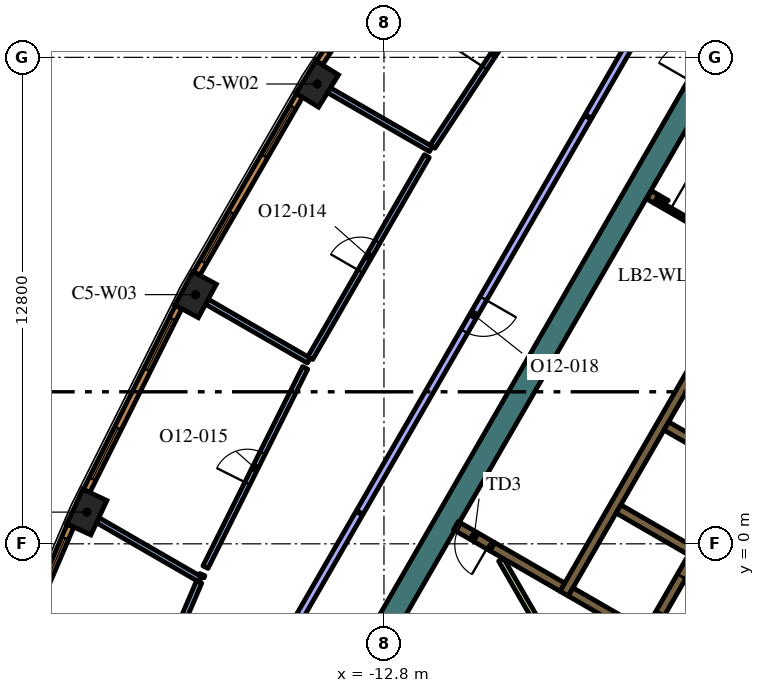
"""IFC4 building model, lengths in metres.
Left out: names, types, materials, properties, quantities, classifications, styles, units other than length and angle.
Written with IfcOpenShell. Run it as: python <this file> out.ifc"""

import sys

from ifc_helpers import new_model, si_unit, direction, frame, frame_2d, origin, origin_2d, place, context, subcontext, project, spatial, polyline, rectangle, outline, extrude, element, fill, save


model = new_model("IFC4")
c1 = context("Model", 3, precision=1e-05, world=origin(), true_north=direction((0.0, 1.0)))
c2 = subcontext(c1, "Body", "Model", "MODEL_VIEW")
j1 = project(units=[si_unit("LENGTHUNIT", "METRE"), si_unit("PLANEANGLEUNIT", "RADIAN")], contexts=[c1])
p1 = place(None, origin())
s1 = spatial("IfcSite", under=j1, at=p1, CompositionType="ELEMENT")
p2 = place(p1, origin())
s2 = spatial("IfcBuilding", under=s1, at=p2, CompositionType="ELEMENT")
p3 = place(p2, frame((0.0, 0.0, 288.0)))
s3 = spatial("IfcBuildingStorey", under=s2, at=p3, CompositionType="ELEMENT", Elevation=288.0)
for number, where, z_axis, x_axis in (
    (1, (-14.556, 12.098, 0.0), (0.0, 0.0, 1.0), (-0.526, -0.851, 0.0)),
    (2, (-17.756, 6.557, 0.0), (0.0, 0.0, 1.0), (-0.474, -0.881, 0.0)),
    (3, (-20.619, 0.834, 0.0), (0.0, 0.0, 1.0), (-0.421, -0.907, 0.0)),
):
    element("IfcColumn", number, at=place(p3, frame(where, z_axis=z_axis, x_axis=x_axis)), inside=s3, PredefinedType="COLUMN", context=c2, shape_type="SweptSolid", body=[
        extrude(rectangle(XDim=1.0, YDim=0.7, at=origin_2d()), origin(), (0.0, 0.0, 1.0), 4.2),
    ])
p4 = place(p3, origin())
e4 = element("IfcWall", 4, at=p4, inside=s3, PredefinedType="SOLIDWALL", context=c2, shape_type="SweptSolid", body=[
    extrude(outline(polyline([(-15.502, -6.35), (-4.912, 11.992), (-4.393, 11.692), (-10.815, 0.569), (-10.84, 0.583), (-10.84, 0.583), (-10.84, 0.583), (-10.965, 0.367), (-10.965, 0.367), (-10.965, 0.367), (-10.94, 0.352), (-11.033, 0.191), (-14.809, -6.35), (-15.156, -6.95), (-15.502, -6.35)])), origin(), (0.0, 0.0, 1.0), 4.2),
])
p5 = place(p3, frame((-8.06, -1.311, 0.0), z_axis=(0.0, 0.0, 1.0), x_axis=(0.50000273126, 0.866023826885, 0.0)))
e5 = element("IfcWall", 5, at=p5, inside=s3, PredefinedType="SOLIDWALL", context=c2, shape_type="SweptSolid", body=[
    extrude(rectangle(XDim=10.33, YDim=0.25, at=frame_2d((5.165, 0.0))), origin(), (0.0, 0.0, 1.0), 4.2),
])
for number, where, z_axis, x_axis in (
    (6, (-5.369, 3.1, 0.0), (0.0, 0.0, 1.0), (0.866, -0.5, 0.0)),
    (7, (-4.724, -0.182, 0.0), (0.0, 0.0, 1.0), (-0.866, 0.5, 0.0)),
):
    element("IfcWall", number, at=place(p3, frame(where, z_axis=z_axis, x_axis=x_axis)), inside=s3, PredefinedType="SOLIDWALL", context=c2, shape_type="SweptSolid", body=[
        extrude(rectangle(XDim=2.2, YDim=0.25, at=frame_2d((1.1, 0.0))), origin(), (0.0, 0.0, 1.0), 4.2),
    ])
p6 = place(p3, frame((-7.889, -1.265, 0.0), z_axis=(0.0, 0.0, 1.0), x_axis=(0.866057815567, -0.499943856944, 0.0)))
e8 = element("IfcWall", 8, at=p6, inside=s3, PredefinedType="SOLIDWALL", context=c2, shape_type="SweptSolid", body=[
    extrude(rectangle(XDim=2.45, YDim=0.25, at=frame_2d((1.225, 0.0))), origin(), (0.0, 0.0, 1.0), 4.2),
])
p7 = place(p3, frame((-9.95, -0.075, 0.0), z_axis=(0.0, 0.0, 1.0), x_axis=(0.865962177421, -0.500109495288, 0.0)))
e9 = element("IfcWall", 9, at=p7, inside=s3, PredefinedType="SOLIDWALL", context=c2, shape_type="SweptSolid", body=[
    extrude(rectangle(XDim=2.129, YDim=0.25, at=frame_2d((1.065, 0.0))), origin(), (0.0, 0.0, 1.0), 4.2),
])
p8 = place(p3, frame((-5.629, 9.07, 0.0), z_axis=(0.0, 0.0, 1.0), x_axis=(-0.866185586049, 0.49972245349, 0.0)))
e10 = element("IfcWall", 10, at=p8, inside=s3, PredefinedType="SOLIDWALL", context=c2, shape_type="SweptSolid", body=[
    extrude(rectangle(XDim=0.22, YDim=0.25, at=frame_2d((0.11, 0.0))), origin(), (0.0, 0.0, 1.0), 4.2),
])
e11 = element("IfcWall", 11, at=p4, inside=s3, PredefinedType="SOLIDWALL", context=c2, shape_type="SweptSolid", body=[
    extrude(outline(polyline([(-5.689, 8.96), (-5.69, 8.961), (-5.565, 9.177), (-5.319, 9.035), (-5.335, 9.026), (-5.351, 9.015), (-5.366, 9.002), (-5.379, 8.988), (-5.392, 8.972), (-5.402, 8.956), (-5.412, 8.939), (-5.629, 9.064), (-5.629, 9.064), (-5.689, 8.96)])), origin(), (0.0, 0.0, 1.0), 4.2),
])
p9 = place(p3, frame((-9.718, -0.417, 0.0), z_axis=(0.0, 0.0, 1.0), x_axis=(0.499966538646, -0.866044721844, 0.0)))
e12 = element("IfcWall", 12, at=p9, inside=s3, PredefinedType="PARTITIONING", context=c2, shape_type="SweptSolid", body=[
    extrude(rectangle(XDim=2.511, YDim=0.15, at=frame_2d((1.255, 0.0))), origin(), (0.0, 0.0, 1.0), 3.55),
])
p10 = place(p3, frame((-0.898, 6.194, 0.0), z_axis=(0.0, 0.0, 1.0), x_axis=(-0.499996202215, -0.866027596426, 0.0)))
e13 = element("IfcWall", 13, at=p10, inside=s3, PredefinedType="SOLIDWALL", context=c2, shape_type="SweptSolid", body=[
    extrude(rectangle(XDim=9.83, YDim=0.25, at=frame_2d((4.915, 0.0))), origin(), (0.0, 0.0, 1.0), 4.2),
])
p11 = place(p10, frame((0.585, 0.0, 0.0)))
e14 = element("IfcOpeningElement", 14, at=p11, cuts=e13, PredefinedType="OPENING", context=c2, shape_type="SweptSolid", body=[
    extrude(rectangle(XDim=1.1, YDim=2.1, at=frame_2d((0.55, 1.05))), frame((0.0, 0.135, 0.0), z_axis=(0.0, -1.0, 0.0), x_axis=(1.0, 0.0, 0.0)), (0.0, 0.0, 1.0), 0.27),
])
p12 = place(p10, frame((3.105, 0.0, 0.0)))
e15 = element("IfcOpeningElement", 15, at=p12, cuts=e13, PredefinedType="OPENING", context=c2, shape_type="SweptSolid", body=[
    extrude(rectangle(XDim=1.1, YDim=2.1, at=frame_2d((0.55, 1.05))), frame((0.0, 0.135, 0.0), z_axis=(0.0, -1.0, 0.0), x_axis=(1.0, 0.0, 0.0)), (0.0, 0.0, 1.0), 0.27),
])
p13 = place(p10, frame((5.625, 0.0, 0.0)))
e16 = element("IfcOpeningElement", 16, at=p13, cuts=e13, PredefinedType="OPENING", context=c2, shape_type="SweptSolid", body=[
    extrude(rectangle(XDim=1.1, YDim=2.1, at=frame_2d((0.55, 1.05))), frame((0.0, 0.135, 0.0), z_axis=(0.0, -1.0, 0.0), x_axis=(1.0, 0.0, 0.0)), (0.0, 0.0, 1.0), 0.27),
])
p14 = place(p10, frame((8.145, 0.0, 0.0)))
e17 = element("IfcOpeningElement", 17, at=p14, cuts=e13, PredefinedType="OPENING", context=c2, shape_type="SweptSolid", body=[
    extrude(rectangle(XDim=1.1, YDim=2.1, at=frame_2d((0.55, 1.05))), frame((0.0, 0.135, 0.0), z_axis=(0.0, -1.0, 0.0), x_axis=(1.0, 0.0, 0.0)), (0.0, 0.0, 1.0), 0.27),
])
p15 = place(p3, frame((-5.659, 9.012, 0.0), z_axis=(0.0, 0.0, 1.0), x_axis=(0.866009402589, -0.500027713859, 0.0)))
e18 = element("IfcWall", 18, at=p15, inside=s3, PredefinedType="PARTITIONING", context=c2, shape_type="SweptSolid", body=[
    extrude(rectangle(XDim=2.1, YDim=0.12, at=frame_2d((1.05, 0.0))), origin(), (0.0, 0.0, 1.0), 3.55),
])
p16 = place(p15, frame((0.45, 0.0, 0.0)))
e19 = element("IfcOpeningElement", 19, at=p16, cuts=e18, PredefinedType="OPENING", context=c2, shape_type="SweptSolid", body=[
    extrude(rectangle(XDim=1.2, YDim=2.1, at=frame_2d((0.6, 1.05))), frame((0.0, 0.07, 0.0), z_axis=(0.0, -1.0, 0.0), x_axis=(1.0, 0.0, 0.0)), (0.0, 0.0, 1.0), 0.14),
])
p17 = place(p3, frame((-4.652, 11.842, 0.0), z_axis=(0.0, 0.0, 1.0), x_axis=(0.500062241894, 0.865989465428, 0.0)))
e20 = element("IfcWall", 20, at=p17, inside=s3, PredefinedType="SOLIDWALL", context=c2, shape_type="SweptSolid", body=[
    extrude(rectangle(XDim=1.7, YDim=0.6, at=frame_2d((0.85, 0.0))), origin(), (0.0, 0.0, 1.0), 4.2),
])
p18 = place(p17, frame((0.25, 0.0, 0.0)))
e21 = element("IfcOpeningElement", 21, at=p18, cuts=e20, PredefinedType="OPENING", context=c2, shape_type="SweptSolid", body=[
    extrude(rectangle(XDim=1.2, YDim=2.1, at=frame_2d((0.6, 1.05))), frame((0.0, 0.31, 0.0), z_axis=(0.0, -1.0, 0.0), x_axis=(1.0, 0.0, 0.0)), (0.0, 0.0, 1.0), 0.62),
])
p19 = place(p3, frame((-9.95, -0.075, 0.0), z_axis=(0.0, 0.0, 1.0), x_axis=(-0.865952669392, 0.500125958508, 0.0)))
e22 = element("IfcWall", 22, at=p19, inside=s3, PredefinedType="SOLIDWALL", context=c2, shape_type="SweptSolid", body=[
    extrude(rectangle(XDim=1.1, YDim=0.25, at=frame_2d((0.55, 0.0))), origin(), (0.0, 0.0, 1.0), 4.2),
])
p20 = place(p19, frame((0.1, 0.0, 0.0)))
e23 = element("IfcOpeningElement", 23, at=p20, cuts=e22, PredefinedType="OPENING", context=c2, shape_type="SweptSolid", body=[
    extrude(rectangle(XDim=0.9, YDim=2.1, at=frame_2d((0.45, 1.05))), frame((0.0, 0.135, 0.0), z_axis=(0.0, -1.0, 0.0), x_axis=(1.0, 0.0, 0.0)), (0.0, 0.0, 1.0), 0.27),
])
p21 = place(p3, frame((-11.564, 10.387, 0.0), z_axis=(0.0, 0.0, 1.0), x_axis=(-0.86604641216, 0.499963610661, 0.0)))
e24 = element("IfcWall", 24, at=p21, inside=s3, PredefinedType="PARTITIONING", context=c2, shape_type="SweptSolid", body=[
    extrude(rectangle(XDim=3.096, YDim=0.15, at=frame_2d((1.548, 0.0))), origin(), (0.0, 0.0, 1.0), 3.55),
])
p22 = place(p3, frame((-11.523, 10.449, 0.0), z_axis=(0.0, 0.0, 1.0), x_axis=(0.550751709023, 0.834669129061, 0.0)))
e25 = element("IfcWall", 25, at=p22, inside=s3, PredefinedType="PARTITIONING", context=c2, shape_type="SweptSolid", body=[
    extrude(rectangle(XDim=5.788, YDim=0.15, at=frame_2d((2.894, 0.0))), origin(), (0.0, 0.0, 1.0), 3.55),
])
p23 = place(p22, frame((2.488, 0.0, 0.0)))
e26 = element("IfcOpeningElement", 26, at=p23, cuts=e25, PredefinedType="OPENING", context=c2, shape_type="SweptSolid", body=[
    extrude(rectangle(XDim=0.9, YDim=2.1, at=frame_2d((0.45, 1.05))), frame((0.0, 0.085, 0.0), z_axis=(0.0, -1.0, 0.0), x_axis=(1.0, 0.0, 0.0)), (0.0, 0.0, 1.0), 0.17),
])
p24 = place(p3, frame((-14.777, 4.822, 0.0), z_axis=(0.0, 0.0, 1.0), x_axis=(-0.865992557167, 0.500056887695, 0.0)))
e27 = element("IfcWall", 27, at=p24, inside=s3, PredefinedType="PARTITIONING", context=c2, shape_type="SweptSolid", body=[
    extrude(rectangle(XDim=3.096, YDim=0.15, at=frame_2d((1.548, 0.0))), origin(), (0.0, 0.0, 1.0), 3.55),
])
p25 = place(p3, frame((-14.74, 4.887, 0.0), z_axis=(0.0, 0.0, 1.0), x_axis=(0.500007141444, 0.86602128063, 0.0)))
e28 = element("IfcWall", 28, at=p25, inside=s3, PredefinedType="PARTITIONING", context=c2, shape_type="SweptSolid", body=[
    extrude(rectangle(XDim=6.137, YDim=0.15, at=frame_2d((3.068, 0.0))), origin(), (0.0, 0.0, 1.0), 3.55),
])
p26 = place(p25, frame((2.637, 0.0, 0.0)))
e29 = element("IfcOpeningElement", 29, at=p26, cuts=e28, PredefinedType="OPENING", context=c2, shape_type="SweptSolid", body=[
    extrude(rectangle(XDim=0.9, YDim=2.1, at=frame_2d((0.45, 1.05))), frame((0.0, 0.085, 0.0), z_axis=(0.0, -1.0, 0.0), x_axis=(1.0, 0.0, 0.0)), (0.0, 0.0, 1.0), 0.17),
])
p27 = place(p3, frame((-17.635, -0.936, 0.0), z_axis=(0.0, 0.0, 1.0), x_axis=(-0.866044607523, 0.499966736674, 0.0)))
e30 = element("IfcWall", 30, at=p27, inside=s3, PredefinedType="PARTITIONING", context=c2, shape_type="SweptSolid", body=[
    extrude(rectangle(XDim=3.115, YDim=0.15, at=frame_2d((1.557, 0.0))), origin(), (0.0, 0.0, 1.0), 3.55),
])
p28 = place(p3, frame((-17.497, -0.613, 0.0), z_axis=(0.0, 0.0, 1.0), x_axis=(0.447480081559, 0.89429389834, 0.0)))
e31 = element("IfcWall", 31, at=p28, inside=s3, PredefinedType="PARTITIONING", context=c2, shape_type="SweptSolid", body=[
    extrude(rectangle(XDim=5.863, YDim=0.15, at=frame_2d((2.931, 0.0))), origin(), (0.0, 0.0, 1.0), 3.55),
])
p29 = place(p28, frame((2.463, 0.0, 0.0)))
e32 = element("IfcOpeningElement", 32, at=p29, cuts=e31, PredefinedType="OPENING", context=c2, shape_type="SweptSolid", body=[
    extrude(rectangle(XDim=0.9, YDim=2.1, at=frame_2d((0.45, 1.05))), frame((0.0, 0.085, 0.0), z_axis=(0.0, -1.0, 0.0), x_axis=(1.0, 0.0, 0.0)), (0.0, 0.0, 1.0), 0.17),
])
p30 = place(p3, frame((-17.581, -0.81, 0.0), z_axis=(0.0, 0.0, 1.0), x_axis=(-0.390033474923, -0.92080067791, 0.0)))
e33 = element("IfcWall", 33, at=p30, inside=s3, PredefinedType="PARTITIONING", context=c2, shape_type="SweptSolid", body=[
    extrude(rectangle(XDim=0.061, YDim=0.15, at=frame_2d((0.03, 0.0))), origin(), (0.0, 0.0, 1.0), 3.55),
])
p31 = place(p3, frame((-19.608, -5.549, 0.0), z_axis=(0.0, 0.0, 1.0), x_axis=(0.393352855097, 0.919387584964, 0.0)))
e34 = element("IfcWall", 34, at=p31, inside=s3, PredefinedType="PARTITIONING", context=c2, shape_type="SweptSolid", body=[
    extrude(rectangle(XDim=4.942, YDim=0.15, at=frame_2d((2.471, 0.0))), origin(), (0.0, 0.0, 1.0), 3.55),
])
p32 = place(p31, frame((2.042, 0.0, 0.0)))
e35 = element("IfcOpeningElement", 35, at=p32, cuts=e34, PredefinedType="OPENING", context=c2, shape_type="SweptSolid", body=[
    extrude(rectangle(XDim=0.9, YDim=2.1, at=frame_2d((0.45, 1.05))), frame((0.0, 0.085, 0.0), z_axis=(0.0, -1.0, 0.0), x_axis=(1.0, 0.0, 0.0)), (0.0, 0.0, 1.0), 0.17),
])
p33 = place(p3, frame((-7.436, 11.221, 0.0), z_axis=(0.0, 0.0, 1.0), x_axis=(-0.49999894854, -0.866026010844, 0.0)))
e36 = element("IfcWall", 36, at=p33, inside=s3, PredefinedType="PARTITIONING", context=c2, shape_type="SweptSolid", body=[
    extrude(rectangle(XDim=12.0, YDim=0.2, at=frame_2d((6.0, 0.0))), origin(), (0.0, 0.0, 1.0), 3.55),
])
p34 = place(p33, frame((5.5, 0.0, 0.0)))
e37 = element("IfcOpeningElement", 37, at=p34, cuts=e36, PredefinedType="OPENING", context=c2, shape_type="SweptSolid", body=[
    extrude(rectangle(XDim=1.0, YDim=2.1, at=frame_2d((0.5, 1.05))), frame((0.0, 0.11, 0.0), z_axis=(0.0, -1.0, 0.0), x_axis=(1.0, 0.0, 0.0)), (0.0, 0.0, 1.0), 0.22),
])
p35 = place(p3, frame((-13.451, 0.803, 0.0), z_axis=(0.0, 0.0, 1.0), x_axis=(-0.499982585408, -0.86603545787, 0.0)))
e38 = element("IfcWall", 38, at=p35, inside=s3, PredefinedType="PARTITIONING", context=c2, shape_type="SweptSolid", body=[
    extrude(rectangle(XDim=8.26, YDim=0.2, at=frame_2d((4.13, 0.0))), origin(), (0.0, 0.0, 1.0), 3.55),
])
p36 = place(p3, frame((-3.306, 18.374, 0.0), z_axis=(0.0, 0.0, 1.0), x_axis=(-0.499999798456, -0.866025520146, 0.0)))
e39 = element("IfcWall", 39, at=p36, inside=s3, PredefinedType="PARTITIONING", context=c2, shape_type="SweptSolid", body=[
    extrude(rectangle(XDim=8.229, YDim=0.2, at=frame_2d((4.115, 0.0))), origin(), (0.0, 0.0, 1.0), 3.55),
])
p37 = place(p3, frame((-11.518, 17.166, 0.0), z_axis=(0.0, 0.0, 1.0), x_axis=(-0.550744054781, -0.83467417962, 0.0)))
e40 = element("IfcWall", 40, at=p37, inside=s3, PredefinedType="SOLIDWALL", context=c2, shape_type="SweptSolid", body=[
    extrude(rectangle(XDim=5.406, YDim=0.19, at=frame_2d((2.703, 0.0))), origin(), (0.0, 0.0, 1.0), 3.95),
])
p38 = place(p37, frame((0.346, 0.0, 0.6)))
e41 = element("IfcOpeningElement", 41, at=p38, cuts=e40, PredefinedType="OPENING", context=c2, shape_type="SweptSolid", body=[
    extrude(rectangle(XDim=1.5, YDim=2.85, at=frame_2d((0.75, 1.425))), frame((0.0, 0.105, 0.0), z_axis=(0.0, -1.0, 0.0), x_axis=(1.0, 0.0, 0.0)), (0.0, 0.0, 1.0), 0.21),
])
p39 = place(p37, frame((3.559, 0.0, 0.6)))
e42 = element("IfcOpeningElement", 42, at=p39, cuts=e40, PredefinedType="OPENING", context=c2, shape_type="SweptSolid", body=[
    extrude(rectangle(XDim=1.5, YDim=2.85, at=frame_2d((0.75, 1.425))), frame((0.0, 0.105, 0.0), z_axis=(0.0, -1.0, 0.0), x_axis=(1.0, 0.0, 0.0)), (0.0, 0.0, 1.0), 0.21),
])
p40 = place(p3, frame((-15.025, 11.796, 0.0), z_axis=(0.0, 0.0, 1.0), x_axis=(-0.500024767483, -0.866011103799, 0.0)))
e43 = element("IfcWall", 43, at=p40, inside=s3, PredefinedType="SOLIDWALL", context=c2, shape_type="SweptSolid", body=[
    extrude(rectangle(XDim=5.406, YDim=0.19, at=frame_2d((2.703, 0.0))), origin(), (0.0, 0.0, 1.0), 3.95),
])
p41 = place(p40, frame((0.346, 0.0, 0.6)))
e44 = element("IfcOpeningElement", 44, at=p41, cuts=e43, PredefinedType="OPENING", context=c2, shape_type="SweptSolid", body=[
    extrude(rectangle(XDim=1.5, YDim=2.85, at=frame_2d((0.75, 1.425))), frame((0.0, 0.105, 0.0), z_axis=(0.0, -1.0, 0.0), x_axis=(1.0, 0.0, 0.0)), (0.0, 0.0, 1.0), 0.21),
])
p42 = place(p40, frame((3.559, 0.0, 0.6)))
e45 = element("IfcOpeningElement", 45, at=p42, cuts=e43, PredefinedType="OPENING", context=c2, shape_type="SweptSolid", body=[
    extrude(rectangle(XDim=1.5, YDim=2.85, at=frame_2d((0.75, 1.425))), frame((0.0, 0.105, 0.0), z_axis=(0.0, -1.0, 0.0), x_axis=(1.0, 0.0, 0.0)), (0.0, 0.0, 1.0), 0.21),
])
p43 = place(p3, frame((-18.206, 6.227, 0.0), z_axis=(0.0, 0.0, 1.0), x_axis=(-0.447484531401, -0.894291671747, 0.0)))
e46 = element("IfcWall", 46, at=p43, inside=s3, PredefinedType="SOLIDWALL", context=c2, shape_type="SweptSolid", body=[
    extrude(rectangle(XDim=5.406, YDim=0.19, at=frame_2d((2.703, 0.0))), origin(), (0.0, 0.0, 1.0), 3.95),
])
p44 = place(p43, frame((0.346, 0.0, 0.6)))
e47 = element("IfcOpeningElement", 47, at=p44, cuts=e46, PredefinedType="OPENING", context=c2, shape_type="SweptSolid", body=[
    extrude(rectangle(XDim=1.5, YDim=2.85, at=frame_2d((0.75, 1.425))), frame((0.0, 0.105, 0.0), z_axis=(0.0, -1.0, 0.0), x_axis=(1.0, 0.0, 0.0)), (0.0, 0.0, 1.0), 0.21),
])
p45 = place(p43, frame((3.559, 0.0, 0.6)))
e48 = element("IfcOpeningElement", 48, at=p45, cuts=e46, PredefinedType="OPENING", context=c2, shape_type="SweptSolid", body=[
    extrude(rectangle(XDim=1.5, YDim=2.85, at=frame_2d((0.75, 1.425))), frame((0.0, 0.105, 0.0), z_axis=(0.0, -1.0, 0.0), x_axis=(1.0, 0.0, 0.0)), (0.0, 0.0, 1.0), 0.21),
])
p46 = place(p3, frame((-21.049, 0.478, 0.0), z_axis=(0.0, 0.0, 1.0), x_axis=(-0.393347848476, -0.919389726992, 0.0)))
e49 = element("IfcWall", 49, at=p46, inside=s3, PredefinedType="SOLIDWALL", context=c2, shape_type="SweptSolid", body=[
    extrude(rectangle(XDim=5.415, YDim=0.19, at=frame_2d((2.708, 0.0))), origin(), (0.0, 0.0, 1.0), 3.95),
])
p47 = place(p46, frame((0.357, 0.0, 0.6)))
e50 = element("IfcOpeningElement", 50, at=p47, cuts=e49, PredefinedType="OPENING", context=c2, shape_type="SweptSolid", body=[
    extrude(rectangle(XDim=1.5, YDim=2.85, at=frame_2d((0.75, 1.425))), frame((0.0, 0.105, 0.0), z_axis=(0.0, -1.0, 0.0), x_axis=(1.0, 0.0, 0.0)), (0.0, 0.0, 1.0), 0.21),
])
p48 = place(p46, frame((3.593, 0.0, 0.6)))
e51 = element("IfcOpeningElement", 51, at=p48, cuts=e49, PredefinedType="OPENING", context=c2, shape_type="SweptSolid", body=[
    extrude(rectangle(XDim=1.5, YDim=2.85, at=frame_2d((0.75, 1.425))), frame((0.0, 0.105, 0.0), z_axis=(0.0, -1.0, 0.0), x_axis=(1.0, 0.0, 0.0)), (0.0, 0.0, 1.0), 0.21),
])
p49 = place(p14, origin())
e52 = element("IfcDoor", 52, at=p49, inside=s3, OperationType="DOUBLE_DOOR_SLIDING", PredefinedType="DOOR", context=c2, shape_type="SweptSolid", body=[
    extrude(rectangle(XDim=1.1, YDim=2.1, at=frame_2d((0.55, 1.05))), frame((0.0, 0.025, 0.0), z_axis=(0.0, -1.0, 0.0), x_axis=(1.0, 0.0, 0.0)), (0.0, 0.0, 1.0), 0.05),
])
fill(e17, e52)
p50 = place(p16, origin())
e53 = element("IfcDoor", 53, at=p50, inside=s3, OperationType="SINGLE_SWING_LEFT", PredefinedType="DOOR", context=c2, shape_type="SweptSolid", body=[
    extrude(rectangle(XDim=1.2, YDim=2.1, at=frame_2d((0.6, 1.05))), frame((0.0, 0.025, 0.0), z_axis=(0.0, -1.0, 0.0), x_axis=(1.0, 0.0, 0.0)), (0.0, 0.0, 1.0), 0.05),
])
fill(e19, e53)
p51 = place(p20, origin())
e54 = element("IfcDoor", 54, at=p51, inside=s3, OperationType="SINGLE_SWING_LEFT", PredefinedType="DOOR", context=c2, shape_type="SweptSolid", body=[
    extrude(rectangle(XDim=0.9, YDim=2.1, at=frame_2d((0.45, 1.05))), frame((0.0, 0.025, 0.0), z_axis=(0.0, -1.0, 0.0), x_axis=(1.0, 0.0, 0.0)), (0.0, 0.0, 1.0), 0.05),
])
fill(e23, e54)
p52 = place(p23, origin())
e55 = element("IfcDoor", 55, at=p52, inside=s3, OperationType="SINGLE_SWING_RIGHT", PredefinedType="DOOR", context=c2, shape_type="SweptSolid", body=[
    extrude(rectangle(XDim=0.9, YDim=2.1, at=frame_2d((0.45, 1.05))), frame((0.0, 0.025, 0.0), z_axis=(0.0, -1.0, 0.0), x_axis=(1.0, 0.0, 0.0)), (0.0, 0.0, 1.0), 0.05),
])
fill(e26, e55)
p53 = place(p26, origin())
e56 = element("IfcDoor", 56, at=p53, inside=s3, OperationType="SINGLE_SWING_RIGHT", PredefinedType="DOOR", context=c2, shape_type="SweptSolid", body=[
    extrude(rectangle(XDim=0.9, YDim=2.1, at=frame_2d((0.45, 1.05))), frame((0.0, 0.025, 0.0), z_axis=(0.0, -1.0, 0.0), x_axis=(1.0, 0.0, 0.0)), (0.0, 0.0, 1.0), 0.05),
])
fill(e29, e56)
p54 = place(p29, origin())
e57 = element("IfcDoor", 57, at=p54, inside=s3, OperationType="SINGLE_SWING_LEFT", PredefinedType="DOOR", context=c2, shape_type="SweptSolid", body=[
    extrude(rectangle(XDim=0.9, YDim=2.1, at=frame_2d((0.45, 1.05))), frame((0.0, 0.025, 0.0), z_axis=(0.0, -1.0, 0.0), x_axis=(1.0, 0.0, 0.0)), (0.0, 0.0, 1.0), 0.05),
])
fill(e32, e57)
p55 = place(p34, origin())
e58 = element("IfcDoor", 58, at=p55, inside=s3, OperationType="SINGLE_SWING_RIGHT", PredefinedType="DOOR", context=c2, shape_type="SweptSolid", body=[
    extrude(rectangle(XDim=1.0, YDim=2.1, at=frame_2d((0.5, 1.05))), frame((0.0, 0.025, 0.0), z_axis=(0.0, -1.0, 0.0), x_axis=(1.0, 0.0, 0.0)), (0.0, 0.0, 1.0), 0.05),
])
fill(e37, e58)
p56 = place(p39, origin())
e59 = element("IfcWindow", 59, at=p56, inside=s3, PartitioningType="SINGLE_PANEL", PredefinedType="WINDOW", context=c2, shape_type="SweptSolid", body=[
    extrude(rectangle(XDim=1.5, YDim=2.85, at=frame_2d((0.75, 1.425))), frame((0.0, 0.045, 0.0), z_axis=(0.0, -1.0, 0.0), x_axis=(1.0, 0.0, 0.0)), (0.0, 0.0, 1.0), 0.06),
])
fill(e42, e59)
p57 = place(p41, origin())
e60 = element("IfcWindow", 60, at=p57, inside=s3, PartitioningType="SINGLE_PANEL", PredefinedType="WINDOW", context=c2, shape_type="SweptSolid", body=[
    extrude(rectangle(XDim=1.5, YDim=2.85, at=frame_2d((0.75, 1.425))), frame((0.0, 0.045, 0.0), z_axis=(0.0, -1.0, 0.0), x_axis=(1.0, 0.0, 0.0)), (0.0, 0.0, 1.0), 0.06),
])
fill(e44, e60)
p58 = place(p42, origin())
e61 = element("IfcWindow", 61, at=p58, inside=s3, PartitioningType="SINGLE_PANEL", PredefinedType="WINDOW", context=c2, shape_type="SweptSolid", body=[
    extrude(rectangle(XDim=1.5, YDim=2.85, at=frame_2d((0.75, 1.425))), frame((0.0, 0.045, 0.0), z_axis=(0.0, -1.0, 0.0), x_axis=(1.0, 0.0, 0.0)), (0.0, 0.0, 1.0), 0.06),
])
fill(e45, e61)
p59 = place(p44, origin())
e62 = element("IfcWindow", 62, at=p59, inside=s3, PartitioningType="SINGLE_PANEL", PredefinedType="WINDOW", context=c2, shape_type="SweptSolid", body=[
    extrude(rectangle(XDim=1.5, YDim=2.85, at=frame_2d((0.75, 1.425))), frame((0.0, 0.045, 0.0), z_axis=(0.0, -1.0, 0.0), x_axis=(1.0, 0.0, 0.0)), (0.0, 0.0, 1.0), 0.06),
])
fill(e47, e62)
p60 = place(p45, origin())
e63 = element("IfcWindow", 63, at=p60, inside=s3, PartitioningType="SINGLE_PANEL", PredefinedType="WINDOW", context=c2, shape_type="SweptSolid", body=[
    extrude(rectangle(XDim=1.5, YDim=2.85, at=frame_2d((0.75, 1.425))), frame((0.0, 0.045, 0.0), z_axis=(0.0, -1.0, 0.0), x_axis=(1.0, 0.0, 0.0)), (0.0, 0.0, 1.0), 0.06),
])
fill(e48, e63)
p61 = place(p47, origin())
e64 = element("IfcWindow", 64, at=p61, inside=s3, PartitioningType="SINGLE_PANEL", PredefinedType="WINDOW", context=c2, shape_type="SweptSolid", body=[
    extrude(rectangle(XDim=1.5, YDim=2.85, at=frame_2d((0.75, 1.425))), frame((0.0, 0.045, 0.0), z_axis=(0.0, -1.0, 0.0), x_axis=(1.0, 0.0, 0.0)), (0.0, 0.0, 1.0), 0.06),
])
fill(e50, e64)
save(model, sys.argv[1])
